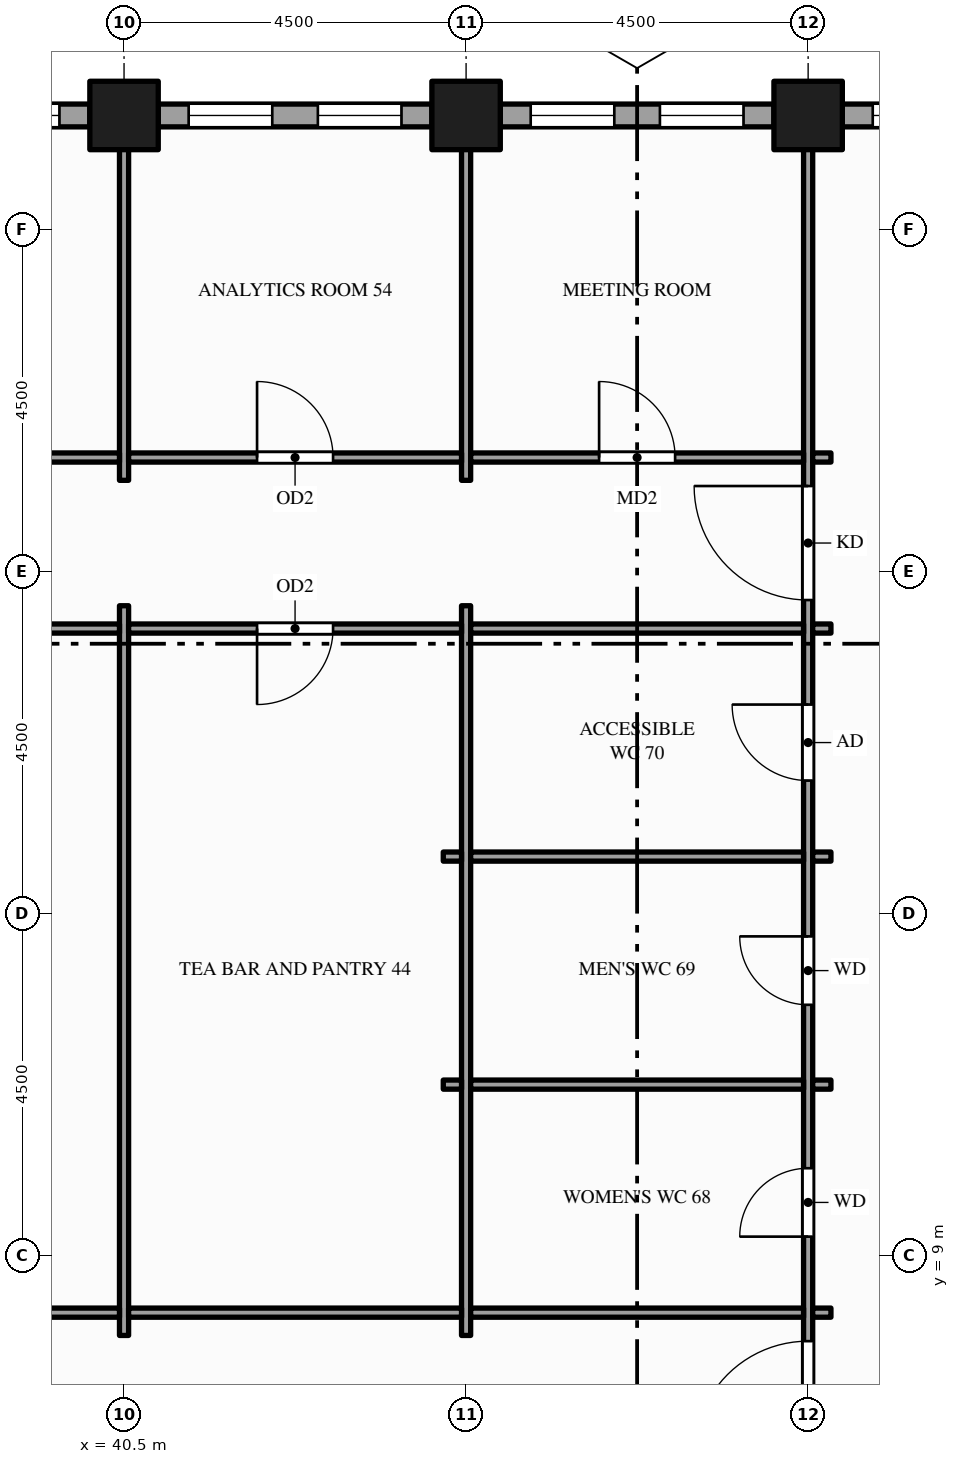
"""IFC4 building model, lengths in metres.
Left out: names, types, materials, properties, quantities, classifications, styles, units other than length and angle.
Written with IfcOpenShell. Run it as: python <this file> out.ifc"""

import sys

from ifc_helpers import new_model, si_unit, direction, frame, frame_2d, origin, origin_2d, place, context, subcontext, project, spatial, rectangle, hollow_rectangle, extrude, element, fill, save


model = new_model("IFC4")
c1 = context("Model", 3, precision=1e-05, world=origin(), true_north=direction((0.0, 1.0)))
c2 = subcontext(c1, "Body", "Model", "MODEL_VIEW")
j1 = project(units=[si_unit("LENGTHUNIT", "METRE"), si_unit("PLANEANGLEUNIT", "RADIAN")], contexts=[c1])
p1 = place(None, origin())
s1 = spatial("IfcSite", under=j1, at=p1, CompositionType="ELEMENT")
p2 = place(p1, origin())
s2 = spatial("IfcBuilding", under=s1, at=p2, CompositionType="ELEMENT")
p3 = place(p2, frame((0.0, 0.0, 159.0)))
s3 = spatial("IfcBuildingStorey", under=s2, at=p3, CompositionType="ELEMENT", Elevation=159.0)
for number, where, z_axis, x_axis in (
    (1, (40.5, 24.0, -0.15), (0.0, 0.0, 1.0), (1.0, 0.0, 0.0)),
    (2, (45.0, 24.0, -0.15), (0.0, 0.0, 1.0), (1.0, 0.0, 0.0)),
    (3, (49.5, 24.0, -0.15), (0.0, 0.0, 1.0), (1.0, 0.0, 0.0)),
):
    element("IfcColumn", number, at=place(p3, frame(where, z_axis=z_axis, x_axis=x_axis)), inside=s3, PredefinedType="COLUMN", context=c2, shape_type="SweptSolid", body=[
        extrude(hollow_rectangle(XDim=0.9, YDim=0.9, WallThickness=0.045, at=origin_2d()), origin(), (0.0, 0.0, 1.0), 4.0),
    ])
p4 = place(p3, frame((53.55, 24.0, 0.0), z_axis=(0.0, 0.0, 1.0), x_axis=(-1.0, 0.0, 0.0)))
e4 = element("IfcWall", 4, at=p4, inside=s3, PredefinedType="STANDARD", context=c2, shape_type="SweptSolid", body=[
    extrude(rectangle(XDim=3.6, YDim=0.3, at=frame_2d((1.8, 0.0))), origin(), (0.0, 0.0, 1.0), 2.87),
])
p5 = place(p4, frame((0.4, 0.0, 0.9)))
e5 = element("IfcOpeningElement", 5, at=p5, cuts=e4, PredefinedType="OPENING", context=c2, shape_type="SweptSolid", body=[
    extrude(rectangle(XDim=1.1, YDim=1.75, at=frame_2d((0.55, 0.875))), frame((0.0, 0.16, 0.0), z_axis=(0.0, -1.0, 0.0), x_axis=(1.0, 0.0, 0.0)), (0.0, 0.0, 1.0), 0.32),
])
p6 = place(p4, frame((2.1, 0.0, 0.9)))
e6 = element("IfcOpeningElement", 6, at=p6, cuts=e4, PredefinedType="OPENING", context=c2, shape_type="SweptSolid", body=[
    extrude(rectangle(XDim=1.1, YDim=1.75, at=frame_2d((0.55, 0.875))), frame((0.0, 0.16, 0.0), z_axis=(0.0, -1.0, 0.0), x_axis=(1.0, 0.0, 0.0)), (0.0, 0.0, 1.0), 0.32),
])
p7 = place(p3, frame((49.05, 24.0, 0.0), z_axis=(0.0, 0.0, 1.0), x_axis=(-1.0, 0.0, 0.0)))
e7 = element("IfcWall", 7, at=p7, inside=s3, PredefinedType="STANDARD", context=c2, shape_type="SweptSolid", body=[
    extrude(rectangle(XDim=3.6, YDim=0.3, at=frame_2d((1.8, 0.0))), origin(), (0.0, 0.0, 1.0), 2.87),
])
p8 = place(p7, frame((0.4, 0.0, 0.9)))
e8 = element("IfcOpeningElement", 8, at=p8, cuts=e7, PredefinedType="OPENING", context=c2, shape_type="SweptSolid", body=[
    extrude(rectangle(XDim=1.1, YDim=1.75, at=frame_2d((0.55, 0.875))), frame((0.0, 0.16, 0.0), z_axis=(0.0, -1.0, 0.0), x_axis=(1.0, 0.0, 0.0)), (0.0, 0.0, 1.0), 0.32),
])
p9 = place(p7, frame((2.1, 0.0, 0.9)))
e9 = element("IfcOpeningElement", 9, at=p9, cuts=e7, PredefinedType="OPENING", context=c2, shape_type="SweptSolid", body=[
    extrude(rectangle(XDim=1.1, YDim=1.75, at=frame_2d((0.55, 0.875))), frame((0.0, 0.16, 0.0), z_axis=(0.0, -1.0, 0.0), x_axis=(1.0, 0.0, 0.0)), (0.0, 0.0, 1.0), 0.32),
])
p10 = place(p3, frame((44.55, 24.0, 0.0), z_axis=(0.0, 0.0, 1.0), x_axis=(-1.0, 0.0, 0.0)))
e10 = element("IfcWall", 10, at=p10, inside=s3, PredefinedType="STANDARD", context=c2, shape_type="SweptSolid", body=[
    extrude(rectangle(XDim=3.6, YDim=0.3, at=frame_2d((1.8, 0.0))), origin(), (0.0, 0.0, 1.0), 2.87),
])
p11 = place(p10, frame((0.4, 0.0, 0.9)))
e11 = element("IfcOpeningElement", 11, at=p11, cuts=e10, PredefinedType="OPENING", context=c2, shape_type="SweptSolid", body=[
    extrude(rectangle(XDim=1.1, YDim=1.75, at=frame_2d((0.55, 0.875))), frame((0.0, 0.16, 0.0), z_axis=(0.0, -1.0, 0.0), x_axis=(1.0, 0.0, 0.0)), (0.0, 0.0, 1.0), 0.32),
])
p12 = place(p10, frame((2.1, 0.0, 0.9)))
e12 = element("IfcOpeningElement", 12, at=p12, cuts=e10, PredefinedType="OPENING", context=c2, shape_type="SweptSolid", body=[
    extrude(rectangle(XDim=1.1, YDim=1.75, at=frame_2d((0.55, 0.875))), frame((0.0, 0.16, 0.0), z_axis=(0.0, -1.0, 0.0), x_axis=(1.0, 0.0, 0.0)), (0.0, 0.0, 1.0), 0.32),
])
p13 = place(p3, frame((40.05, 24.0, 0.0), z_axis=(0.0, 0.0, 1.0), x_axis=(-1.0, 0.0, 0.0)))
e13 = element("IfcWall", 13, at=p13, inside=s3, PredefinedType="STANDARD", context=c2, shape_type="SweptSolid", body=[
    extrude(rectangle(XDim=3.6, YDim=0.3, at=frame_2d((1.8, 0.0))), origin(), (0.0, 0.0, 1.0), 2.87),
])
p14 = place(p13, frame((0.4, 0.0, 0.9)))
e14 = element("IfcOpeningElement", 14, at=p14, cuts=e13, PredefinedType="OPENING", context=c2, shape_type="SweptSolid", body=[
    extrude(rectangle(XDim=1.1, YDim=1.75, at=frame_2d((0.55, 0.875))), frame((0.0, 0.16, 0.0), z_axis=(0.0, -1.0, 0.0), x_axis=(1.0, 0.0, 0.0)), (0.0, 0.0, 1.0), 0.32),
])
p15 = place(p13, frame((2.1, 0.0, 0.9)))
e15 = element("IfcOpeningElement", 15, at=p15, cuts=e13, PredefinedType="OPENING", context=c2, shape_type="SweptSolid", body=[
    extrude(rectangle(XDim=1.1, YDim=1.75, at=frame_2d((0.55, 0.875))), frame((0.0, 0.16, 0.0), z_axis=(0.0, -1.0, 0.0), x_axis=(1.0, 0.0, 0.0)), (0.0, 0.0, 1.0), 0.32),
])
p16 = place(p3, frame((40.5, 7.95, 0.0), z_axis=(0.0, 0.0, 1.0), x_axis=(0.0, 1.0, 0.0)))
e16 = element("IfcWall", 16, at=p16, inside=s3, PredefinedType="PARTITIONING", context=c2, shape_type="SweptSolid", body=[
    extrude(rectangle(XDim=9.6, YDim=0.12, at=frame_2d((4.8, 0.0))), origin(), (0.0, 0.0, 1.0), 2.87),
])
p17 = place(p3, frame((40.5, 19.2, 0.0), z_axis=(0.0, 0.0, 1.0), x_axis=(0.0, 1.0, 0.0)))
e17 = element("IfcWall", 17, at=p17, inside=s3, PredefinedType="PARTITIONING", context=c2, shape_type="SweptSolid", body=[
    extrude(rectangle(XDim=4.65, YDim=0.12, at=frame_2d((2.325, 0.0))), origin(), (0.0, 0.0, 1.0), 2.87),
])
p18 = place(p3, frame((45.0, 7.95, 0.0), z_axis=(0.0, 0.0, 1.0), x_axis=(0.0, 1.0, 0.0)))
e18 = element("IfcWall", 18, at=p18, inside=s3, PredefinedType="PARTITIONING", context=c2, shape_type="SweptSolid", body=[
    extrude(rectangle(XDim=9.6, YDim=0.12, at=frame_2d((4.8, 0.0))), origin(), (0.0, 0.0, 1.0), 2.87),
])
p19 = place(p3, frame((45.0, 19.2, 0.0), z_axis=(0.0, 0.0, 1.0), x_axis=(0.0, 1.0, 0.0)))
e19 = element("IfcWall", 19, at=p19, inside=s3, PredefinedType="PARTITIONING", context=c2, shape_type="SweptSolid", body=[
    extrude(rectangle(XDim=4.65, YDim=0.12, at=frame_2d((2.325, 0.0))), origin(), (0.0, 0.0, 1.0), 2.87),
])
p20 = place(p3, frame((49.5, 1.65, 0.0), z_axis=(0.0, 0.0, 1.0), x_axis=(0.0, 1.0, 0.0)))
e20 = element("IfcWall", 20, at=p20, inside=s3, PredefinedType="PARTITIONING", context=c2, shape_type="SweptSolid", body=[
    extrude(rectangle(XDim=22.2, YDim=0.12, at=frame_2d((11.1, 0.0))), origin(), (0.0, 0.0, 1.0), 2.87),
])
p21 = place(p20, frame((4.725, 0.0, 0.0)))
e21 = element("IfcOpeningElement", 21, at=p21, cuts=e20, PredefinedType="OPENING", context=c2, shape_type="SweptSolid", body=[
    extrude(rectangle(XDim=1.5, YDim=2.1, at=frame_2d((0.75, 1.05))), frame((0.0, 0.07, 0.0), z_axis=(0.0, -1.0, 0.0), x_axis=(1.0, 0.0, 0.0)), (0.0, 0.0, 1.0), 0.14),
])
p22 = place(p20, frame((15.975, 0.0, 0.0)))
e22 = element("IfcOpeningElement", 22, at=p22, cuts=e20, PredefinedType="OPENING", context=c2, shape_type="SweptSolid", body=[
    extrude(rectangle(XDim=1.5, YDim=2.1, at=frame_2d((0.75, 1.05))), frame((0.0, 0.07, 0.0), z_axis=(0.0, -1.0, 0.0), x_axis=(1.0, 0.0, 0.0)), (0.0, 0.0, 1.0), 0.14),
])
p23 = place(p20, frame((7.6, 0.0, 0.0)))
e23 = element("IfcOpeningElement", 23, at=p23, cuts=e20, PredefinedType="OPENING", context=c2, shape_type="SweptSolid", body=[
    extrude(rectangle(XDim=0.9, YDim=2.1, at=frame_2d((0.45, 1.05))), frame((0.0, 0.07, 0.0), z_axis=(0.0, -1.0, 0.0), x_axis=(1.0, 0.0, 0.0)), (0.0, 0.0, 1.0), 0.14),
])
p24 = place(p20, frame((10.65, 0.0, 0.0)))
e24 = element("IfcOpeningElement", 24, at=p24, cuts=e20, PredefinedType="OPENING", context=c2, shape_type="SweptSolid", body=[
    extrude(rectangle(XDim=0.9, YDim=2.1, at=frame_2d((0.45, 1.05))), frame((0.0, 0.07, 0.0), z_axis=(0.0, -1.0, 0.0), x_axis=(1.0, 0.0, 0.0)), (0.0, 0.0, 1.0), 0.14),
])
p25 = place(p20, frame((13.6, 0.0, 0.0)))
e25 = element("IfcOpeningElement", 25, at=p25, cuts=e20, PredefinedType="OPENING", context=c2, shape_type="SweptSolid", body=[
    extrude(rectangle(XDim=1.0, YDim=2.1, at=frame_2d((0.5, 1.05))), frame((0.0, 0.07, 0.0), z_axis=(0.0, -1.0, 0.0), x_axis=(1.0, 0.0, 0.0)), (0.0, 0.0, 1.0), 0.14),
])
p26 = place(p3, frame((27.06, 8.25, 0.0), z_axis=(0.0, 0.0, 1.0), x_axis=(1.0, 0.0, 0.0)))
e26 = element("IfcWall", 26, at=p26, inside=s3, PredefinedType="PARTITIONING", context=c2, shape_type="SweptSolid", body=[
    extrude(rectangle(XDim=13.38, YDim=0.12, at=frame_2d((6.69, 0.0))), origin(), (0.0, 0.0, 1.0), 2.87),
])
p27 = place(p26, frame((5.79, 0.0, 0.0)))
e27 = element("IfcOpeningElement", 27, at=p27, cuts=e26, PredefinedType="OPENING", context=c2, shape_type="SweptSolid", body=[
    extrude(rectangle(XDim=1.8, YDim=2.1, at=frame_2d((0.9, 1.05))), frame((0.0, 0.07, 0.0), z_axis=(0.0, -1.0, 0.0), x_axis=(1.0, 0.0, 0.0)), (0.0, 0.0, 1.0), 0.14),
])
for number, where, z_axis, x_axis in (
    (28, (40.56, 8.25, 0.0), (0.0, 0.0, 1.0), (1.0, 0.0, 0.0)),
    (29, (45.06, 8.25, 0.0), (0.0, 0.0, 1.0), (1.0, 0.0, 0.0)),
):
    element("IfcWall", number, at=place(p3, frame(where, z_axis=z_axis, x_axis=x_axis)), inside=s3, PredefinedType="PARTITIONING", context=c2, shape_type="SweptSolid", body=[
        extrude(rectangle(XDim=4.38, YDim=0.12, at=frame_2d((2.19, 0.0))), origin(), (0.0, 0.0, 1.0), 2.87),
    ])
for number, where, z_axis, x_axis in (
    (30, (49.56, 8.25, 0.0), (0.0, 0.0, 1.0), (1.0, 0.0, 0.0)),
    (31, (44.7, 11.25, 0.0), (0.0, 0.0, 1.0), (1.0, 0.0, 0.0)),
):
    element("IfcWall", number, at=place(p3, frame(where, z_axis=z_axis, x_axis=x_axis)), inside=s3, PredefinedType="PARTITIONING", context=c2, shape_type="SweptSolid", body=[
        extrude(rectangle(XDim=0.24, YDim=0.12, at=frame_2d((0.12, 0.0))), origin(), (0.0, 0.0, 1.0), 2.87),
    ])
p28 = place(p3, frame((45.06, 11.25, 0.0), z_axis=(0.0, 0.0, 1.0), x_axis=(1.0, 0.0, 0.0)))
e32 = element("IfcWall", 32, at=p28, inside=s3, PredefinedType="PARTITIONING", context=c2, shape_type="SweptSolid", body=[
    extrude(rectangle(XDim=4.38, YDim=0.12, at=frame_2d((2.19, 0.0))), origin(), (0.0, 0.0, 1.0), 2.87),
])
for number, where, z_axis, x_axis in (
    (33, (49.56, 11.25, 0.0), (0.0, 0.0, 1.0), (1.0, 0.0, 0.0)),
    (34, (44.7, 14.25, 0.0), (0.0, 0.0, 1.0), (1.0, 0.0, 0.0)),
):
    element("IfcWall", number, at=place(p3, frame(where, z_axis=z_axis, x_axis=x_axis)), inside=s3, PredefinedType="PARTITIONING", context=c2, shape_type="SweptSolid", body=[
        extrude(rectangle(XDim=0.24, YDim=0.12, at=frame_2d((0.12, 0.0))), origin(), (0.0, 0.0, 1.0), 2.87),
    ])
p29 = place(p3, frame((45.06, 14.25, 0.0), z_axis=(0.0, 0.0, 1.0), x_axis=(1.0, 0.0, 0.0)))
e35 = element("IfcWall", 35, at=p29, inside=s3, PredefinedType="PARTITIONING", context=c2, shape_type="SweptSolid", body=[
    extrude(rectangle(XDim=4.38, YDim=0.12, at=frame_2d((2.19, 0.0))), origin(), (0.0, 0.0, 1.0), 2.87),
])
p30 = place(p3, frame((49.56, 14.25, 0.0), z_axis=(0.0, 0.0, 1.0), x_axis=(1.0, 0.0, 0.0)))
e36 = element("IfcWall", 36, at=p30, inside=s3, PredefinedType="PARTITIONING", context=c2, shape_type="SweptSolid", body=[
    extrude(rectangle(XDim=0.24, YDim=0.12, at=frame_2d((0.12, 0.0))), origin(), (0.0, 0.0, 1.0), 2.87),
])
p31 = place(p3, frame((27.06, 17.25, 0.0), z_axis=(0.0, 0.0, 1.0), x_axis=(1.0, 0.0, 0.0)))
e37 = element("IfcWall", 37, at=p31, inside=s3, PredefinedType="PARTITIONING", context=c2, shape_type="SweptSolid", body=[
    extrude(rectangle(XDim=13.38, YDim=0.12, at=frame_2d((6.69, 0.0))), origin(), (0.0, 0.0, 1.0), 2.87),
])
p32 = place(p3, frame((40.56, 17.25, 0.0), z_axis=(0.0, 0.0, 1.0), x_axis=(1.0, 0.0, 0.0)))
e38 = element("IfcWall", 38, at=p32, inside=s3, PredefinedType="PARTITIONING", context=c2, shape_type="SweptSolid", body=[
    extrude(rectangle(XDim=4.38, YDim=0.12, at=frame_2d((2.19, 0.0))), origin(), (0.0, 0.0, 1.0), 2.87),
])
p33 = place(p32, frame((1.69, 0.0, 0.0)))
e39 = element("IfcOpeningElement", 39, at=p33, cuts=e38, PredefinedType="OPENING", context=c2, shape_type="SweptSolid", body=[
    extrude(rectangle(XDim=1.0, YDim=2.1, at=frame_2d((0.5, 1.05))), frame((0.0, 0.07, 0.0), z_axis=(0.0, -1.0, 0.0), x_axis=(1.0, 0.0, 0.0)), (0.0, 0.0, 1.0), 0.14),
])
p34 = place(p3, frame((45.06, 17.25, 0.0), z_axis=(0.0, 0.0, 1.0), x_axis=(1.0, 0.0, 0.0)))
e40 = element("IfcWall", 40, at=p34, inside=s3, PredefinedType="PARTITIONING", context=c2, shape_type="SweptSolid", body=[
    extrude(rectangle(XDim=4.38, YDim=0.12, at=frame_2d((2.19, 0.0))), origin(), (0.0, 0.0, 1.0), 2.87),
])
p35 = place(p3, frame((49.56, 17.25, 0.0), z_axis=(0.0, 0.0, 1.0), x_axis=(1.0, 0.0, 0.0)))
e41 = element("IfcWall", 41, at=p35, inside=s3, PredefinedType="PARTITIONING", context=c2, shape_type="SweptSolid", body=[
    extrude(rectangle(XDim=0.24, YDim=0.12, at=frame_2d((0.12, 0.0))), origin(), (0.0, 0.0, 1.0), 2.87),
])
p36 = place(p3, frame((33.81, 19.5, 0.0), z_axis=(0.0, 0.0, 1.0), x_axis=(1.0, 0.0, 0.0)))
e42 = element("IfcWall", 42, at=p36, inside=s3, PredefinedType="PARTITIONING", context=c2, shape_type="SweptSolid", body=[
    extrude(rectangle(XDim=6.63, YDim=0.12, at=frame_2d((3.315, 0.0))), origin(), (0.0, 0.0, 1.0), 2.87),
])
p37 = place(p36, frame((2.815, 0.0, 0.0)))
e43 = element("IfcOpeningElement", 43, at=p37, cuts=e42, PredefinedType="OPENING", context=c2, shape_type="SweptSolid", body=[
    extrude(rectangle(XDim=1.0, YDim=2.1, at=frame_2d((0.5, 1.05))), frame((0.0, 0.07, 0.0), z_axis=(0.0, -1.0, 0.0), x_axis=(1.0, 0.0, 0.0)), (0.0, 0.0, 1.0), 0.14),
])
p38 = place(p3, frame((40.56, 19.5, 0.0), z_axis=(0.0, 0.0, 1.0), x_axis=(1.0, 0.0, 0.0)))
e44 = element("IfcWall", 44, at=p38, inside=s3, PredefinedType="PARTITIONING", context=c2, shape_type="SweptSolid", body=[
    extrude(rectangle(XDim=4.38, YDim=0.12, at=frame_2d((2.19, 0.0))), origin(), (0.0, 0.0, 1.0), 2.87),
])
p39 = place(p38, frame((1.69, 0.0, 0.0)))
e45 = element("IfcOpeningElement", 45, at=p39, cuts=e44, PredefinedType="OPENING", context=c2, shape_type="SweptSolid", body=[
    extrude(rectangle(XDim=1.0, YDim=2.1, at=frame_2d((0.5, 1.05))), frame((0.0, 0.07, 0.0), z_axis=(0.0, -1.0, 0.0), x_axis=(1.0, 0.0, 0.0)), (0.0, 0.0, 1.0), 0.14),
])
p40 = place(p3, frame((45.06, 19.5, 0.0), z_axis=(0.0, 0.0, 1.0), x_axis=(1.0, 0.0, 0.0)))
e46 = element("IfcWall", 46, at=p40, inside=s3, PredefinedType="PARTITIONING", context=c2, shape_type="SweptSolid", body=[
    extrude(rectangle(XDim=4.38, YDim=0.12, at=frame_2d((2.19, 0.0))), origin(), (0.0, 0.0, 1.0), 2.87),
])
p41 = place(p40, frame((1.69, 0.0, 0.0)))
e47 = element("IfcOpeningElement", 47, at=p41, cuts=e46, PredefinedType="OPENING", context=c2, shape_type="SweptSolid", body=[
    extrude(rectangle(XDim=1.0, YDim=2.1, at=frame_2d((0.5, 1.05))), frame((0.0, 0.07, 0.0), z_axis=(0.0, -1.0, 0.0), x_axis=(1.0, 0.0, 0.0)), (0.0, 0.0, 1.0), 0.14),
])
p42 = place(p3, frame((49.56, 19.5, 0.0), z_axis=(0.0, 0.0, 1.0), x_axis=(1.0, 0.0, 0.0)))
e48 = element("IfcWall", 48, at=p42, inside=s3, PredefinedType="PARTITIONING", context=c2, shape_type="SweptSolid", body=[
    extrude(rectangle(XDim=0.24, YDim=0.12, at=frame_2d((0.12, 0.0))), origin(), (0.0, 0.0, 1.0), 2.87),
])
p43 = place(p6, origin())
e49 = element("IfcWindow", 49, at=p43, inside=s3, PartitioningType="SINGLE_PANEL", PredefinedType="WINDOW", context=c2, shape_type="SweptSolid", body=[
    extrude(rectangle(XDim=1.1, YDim=1.75, at=frame_2d((0.55, 0.875))), frame((0.0, 0.03, 0.0), z_axis=(0.0, -1.0, 0.0), x_axis=(1.0, 0.0, 0.0)), (0.0, 0.0, 1.0), 0.06),
])
fill(e6, e49)
p44 = place(p8, origin())
e50 = element("IfcWindow", 50, at=p44, inside=s3, PartitioningType="SINGLE_PANEL", PredefinedType="WINDOW", context=c2, shape_type="SweptSolid", body=[
    extrude(rectangle(XDim=1.1, YDim=1.75, at=frame_2d((0.55, 0.875))), frame((0.0, 0.03, 0.0), z_axis=(0.0, -1.0, 0.0), x_axis=(1.0, 0.0, 0.0)), (0.0, 0.0, 1.0), 0.06),
])
fill(e8, e50)
p45 = place(p9, origin())
e51 = element("IfcWindow", 51, at=p45, inside=s3, PartitioningType="SINGLE_PANEL", PredefinedType="WINDOW", context=c2, shape_type="SweptSolid", body=[
    extrude(rectangle(XDim=1.1, YDim=1.75, at=frame_2d((0.55, 0.875))), frame((0.0, 0.03, 0.0), z_axis=(0.0, -1.0, 0.0), x_axis=(1.0, 0.0, 0.0)), (0.0, 0.0, 1.0), 0.06),
])
fill(e9, e51)
p46 = place(p11, origin())
e52 = element("IfcWindow", 52, at=p46, inside=s3, PartitioningType="SINGLE_PANEL", PredefinedType="WINDOW", context=c2, shape_type="SweptSolid", body=[
    extrude(rectangle(XDim=1.1, YDim=1.75, at=frame_2d((0.55, 0.875))), frame((0.0, 0.03, 0.0), z_axis=(0.0, -1.0, 0.0), x_axis=(1.0, 0.0, 0.0)), (0.0, 0.0, 1.0), 0.06),
])
fill(e11, e52)
p47 = place(p12, origin())
e53 = element("IfcWindow", 53, at=p47, inside=s3, PartitioningType="SINGLE_PANEL", PredefinedType="WINDOW", context=c2, shape_type="SweptSolid", body=[
    extrude(rectangle(XDim=1.1, YDim=1.75, at=frame_2d((0.55, 0.875))), frame((0.0, 0.03, 0.0), z_axis=(0.0, -1.0, 0.0), x_axis=(1.0, 0.0, 0.0)), (0.0, 0.0, 1.0), 0.06),
])
fill(e12, e53)
p48 = place(p14, origin())
e54 = element("IfcWindow", 54, at=p48, inside=s3, PartitioningType="SINGLE_PANEL", PredefinedType="WINDOW", context=c2, shape_type="SweptSolid", body=[
    extrude(rectangle(XDim=1.1, YDim=1.75, at=frame_2d((0.55, 0.875))), frame((0.0, 0.03, 0.0), z_axis=(0.0, -1.0, 0.0), x_axis=(1.0, 0.0, 0.0)), (0.0, 0.0, 1.0), 0.06),
])
fill(e14, e54)
p49 = place(p21, origin())
e55 = element("IfcDoor", 55, at=p49, inside=s3, OperationType="SINGLE_SWING_LEFT", PredefinedType="DOOR", context=c2, shape_type="SweptSolid", body=[
    extrude(rectangle(XDim=1.5, YDim=2.1, at=frame_2d((0.75, 1.05))), frame((0.0, 0.025, 0.0), z_axis=(0.0, -1.0, 0.0), x_axis=(1.0, 0.0, 0.0)), (0.0, 0.0, 1.0), 0.05),
])
fill(e21, e55)
p50 = place(p22, origin())
e56 = element("IfcDoor", 56, at=p50, inside=s3, OperationType="SINGLE_SWING_RIGHT", PredefinedType="DOOR", context=c2, shape_type="SweptSolid", body=[
    extrude(rectangle(XDim=1.5, YDim=2.1, at=frame_2d((0.75, 1.05))), frame((0.0, 0.025, 0.0), z_axis=(0.0, -1.0, 0.0), x_axis=(1.0, 0.0, 0.0)), (0.0, 0.0, 1.0), 0.05),
])
fill(e22, e56)
p51 = place(p33, origin())
e57 = element("IfcDoor", 57, at=p51, inside=s3, OperationType="SINGLE_SWING_LEFT", PredefinedType="DOOR", context=c2, shape_type="SweptSolid", body=[
    extrude(rectangle(XDim=1.0, YDim=2.1, at=frame_2d((0.5, 1.05))), frame((0.0, 0.025, 0.0), z_axis=(0.0, -1.0, 0.0), x_axis=(1.0, 0.0, 0.0)), (0.0, 0.0, 1.0), 0.05),
])
fill(e39, e57)
p52 = place(p23, origin())
e58 = element("IfcDoor", 58, at=p52, inside=s3, OperationType="SINGLE_SWING_LEFT", PredefinedType="DOOR", context=c2, shape_type="SweptSolid", body=[
    extrude(rectangle(XDim=0.9, YDim=2.1, at=frame_2d((0.45, 1.05))), frame((0.0, 0.025, 0.0), z_axis=(0.0, -1.0, 0.0), x_axis=(1.0, 0.0, 0.0)), (0.0, 0.0, 1.0), 0.05),
])
fill(e23, e58)
p53 = place(p24, origin())
e59 = element("IfcDoor", 59, at=p53, inside=s3, OperationType="SINGLE_SWING_RIGHT", PredefinedType="DOOR", context=c2, shape_type="SweptSolid", body=[
    extrude(rectangle(XDim=0.9, YDim=2.1, at=frame_2d((0.45, 1.05))), frame((0.0, 0.025, 0.0), z_axis=(0.0, -1.0, 0.0), x_axis=(1.0, 0.0, 0.0)), (0.0, 0.0, 1.0), 0.05),
])
fill(e24, e59)
p54 = place(p25, origin())
e60 = element("IfcDoor", 60, at=p54, inside=s3, OperationType="SINGLE_SWING_RIGHT", PredefinedType="DOOR", context=c2, shape_type="SweptSolid", body=[
    extrude(rectangle(XDim=1.0, YDim=2.1, at=frame_2d((0.5, 1.05))), frame((0.0, 0.025, 0.0), z_axis=(0.0, -1.0, 0.0), x_axis=(1.0, 0.0, 0.0)), (0.0, 0.0, 1.0), 0.05),
])
fill(e25, e60)
p55 = place(p39, origin())
e61 = element("IfcDoor", 61, at=p55, inside=s3, OperationType="SINGLE_SWING_LEFT", PredefinedType="DOOR", context=c2, shape_type="SweptSolid", body=[
    extrude(rectangle(XDim=1.0, YDim=2.1, at=frame_2d((0.5, 1.05))), frame((0.0, 0.025, 0.0), z_axis=(0.0, -1.0, 0.0), x_axis=(1.0, 0.0, 0.0)), (0.0, 0.0, 1.0), 0.05),
])
fill(e45, e61)
p56 = place(p41, origin())
e62 = element("IfcDoor", 62, at=p56, inside=s3, OperationType="SINGLE_SWING_LEFT", PredefinedType="DOOR", context=c2, shape_type="SweptSolid", body=[
    extrude(rectangle(XDim=1.0, YDim=2.1, at=frame_2d((0.5, 1.05))), frame((0.0, 0.025, 0.0), z_axis=(0.0, -1.0, 0.0), x_axis=(1.0, 0.0, 0.0)), (0.0, 0.0, 1.0), 0.05),
])
fill(e47, e62)
save(model, sys.argv[1])
